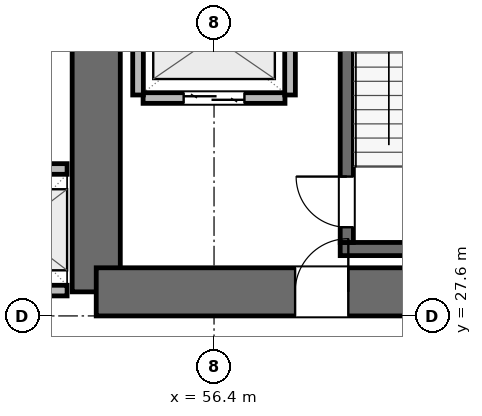
"""IFC4 building model, lengths in metres.
Left out: names, types, materials, properties, quantities, classifications, styles, units other than length and angle.
Written with IfcOpenShell. Run it as: python <this file> out.ifc"""

import sys

from ifc_helpers import new_model, si_unit, direction, frame, frame_2d, origin, place, context, subcontext, project, spatial, rectangle, extrude, element, fill, save


model = new_model("IFC4")
c1 = context("Model", 3, precision=1e-05, world=origin(), true_north=direction((0.0, 1.0)))
c2 = subcontext(c1, "Body", "Model", "MODEL_VIEW")
j1 = project(units=[si_unit("LENGTHUNIT", "METRE"), si_unit("PLANEANGLEUNIT", "RADIAN")], contexts=[c1])
p1 = place(None, origin())
s1 = spatial("IfcSite", under=j1, at=p1, CompositionType="ELEMENT")
p2 = place(p1, origin())
s2 = spatial("IfcBuilding", under=s1, at=p2, CompositionType="ELEMENT")
p3 = place(p2, frame((0.0, 0.0, 89.7)))
s3 = spatial("IfcBuildingStorey", under=s2, at=p3, CompositionType="ELEMENT", Elevation=89.7)
p4 = place(p3, frame((54.075, 28.075, 0.0), z_axis=(0.0, 0.0, 1.0), x_axis=(0.0, 1.0, 0.0)))
e1 = element("IfcWall", 1, at=p4, inside=s3, PredefinedType="SHEAR", context=c2, shape_type="SweptSolid", body=[
    extrude(rectangle(XDim=7.725, YDim=0.95, at=frame_2d((3.863, 0.0))), origin(), (0.0, 0.0, 1.0), 3.9),
])
p5 = place(p3, frame((54.075, 28.075, 0.0), z_axis=(0.0, 0.0, 1.0), x_axis=(1.0, 0.0, 0.0)))
e2 = element("IfcWall", 2, at=p5, inside=s3, PredefinedType="SHEAR", context=c2, shape_type="SweptSolid", body=[
    extrude(rectangle(XDim=9.05, YDim=0.95, at=frame_2d((4.525, 0.0))), origin(), (0.0, 0.0, 1.0), 3.9),
])
p6 = place(p5, frame((3.925, 0.0, 0.0)))
e3 = element("IfcOpeningElement", 3, at=p6, cuts=e2, PredefinedType="OPENING", context=c2, shape_type="SweptSolid", body=[
    extrude(rectangle(XDim=1.05, YDim=2.04, at=frame_2d((0.525, 1.02))), frame((0.0, 0.485, 0.0), z_axis=(0.0, -1.0, 0.0), x_axis=(1.0, 0.0, 0.0)), (0.0, 0.0, 1.0), 0.97),
])
p7 = place(p3, frame((58.89, 28.92, 0.0), z_axis=(0.0, 0.0, 1.0), x_axis=(1.0, 0.0, 0.0)))
e4 = element("IfcWall", 4, at=p7, inside=s3, PredefinedType="SHEAR", context=c2, shape_type="SweptSolid", body=[
    extrude(rectangle(XDim=3.76, YDim=0.26, at=frame_2d((1.88, 0.0))), origin(), (0.0, 0.0, 1.0), 3.9),
])
p8 = place(p3, frame((59.02, 29.05, 0.0), z_axis=(0.0, 0.0, 1.0), x_axis=(0.0, 1.0, 0.0)))
e5 = element("IfcWall", 5, at=p8, inside=s3, PredefinedType="SHEAR", context=c2, shape_type="SweptSolid", body=[
    extrude(rectangle(XDim=7.6, YDim=0.26, at=frame_2d((3.8, 0.0))), origin(), (0.0, 0.0, 1.0), 3.9),
])
p9 = place(p8, frame((0.3, 0.0, 0.0)))
e6 = element("IfcOpeningElement", 6, at=p9, cuts=e5, PredefinedType="OPENING", context=c2, shape_type="SweptSolid", body=[
    extrude(rectangle(XDim=1.0, YDim=2.04, at=frame_2d((0.5, 1.02))), frame((0.0, 0.14, 0.0), z_axis=(0.0, -1.0, 0.0), x_axis=(1.0, 0.0, 0.0)), (0.0, 0.0, 1.0), 0.28),
])
p10 = place(p3, frame((55.0, 31.9, 0.0), z_axis=(0.0, 0.0, 1.0), x_axis=(1.0, 0.0, 0.0)))
e7 = element("IfcWall", 7, at=p10, inside=s3, PredefinedType="PARTITIONING", context=c2, shape_type="SweptSolid", body=[
    extrude(rectangle(XDim=2.8, YDim=0.21, at=frame_2d((1.4, 0.0))), origin(), (0.0, 0.0, 1.0), 3.64),
])
p11 = place(p10, frame((0.8, 0.0, 0.0)))
e8 = element("IfcOpeningElement", 8, at=p11, cuts=e7, PredefinedType="OPENING", context=c2, shape_type="SweptSolid", body=[
    extrude(rectangle(XDim=1.2, YDim=2.04, at=frame_2d((0.6, 1.02))), frame((0.0, 0.115, 0.0), z_axis=(0.0, -1.0, 0.0), x_axis=(1.0, 0.0, 0.0)), (0.0, 0.0, 1.0), 0.23),
])
for number, where, z_axis, x_axis in (
    (9, (54.9, 31.96, 0.0), (0.0, 0.0, 1.0), (0.0, 1.0, 0.0)),
    (10, (57.9, 31.96, 0.0), (0.0, 0.0, 1.0), (0.0, 1.0, 0.0)),
):
    element("IfcWall", number, at=place(p3, frame(where, z_axis=z_axis, x_axis=x_axis)), inside=s3, PredefinedType="PARTITIONING", context=c2, shape_type="SweptSolid", body=[
        extrude(rectangle(XDim=2.28, YDim=0.21, at=frame_2d((1.14, 0.0))), origin(), (0.0, 0.0, 1.0), 3.64),
    ])
p12 = place(p3, frame((51.4, 30.5, 0.0), z_axis=(0.0, 0.0, 1.0), x_axis=(1.0, 0.0, 0.0)))
e11 = element("IfcWall", 11, at=p12, inside=s3, PredefinedType="PARTITIONING", context=c2, shape_type="SweptSolid", body=[
    extrude(rectangle(XDim=2.1, YDim=0.21, at=frame_2d((1.05, 0.0))), origin(), (0.0, 0.0, 1.0), 3.64),
])
p13 = place(p12, frame((0.5, 0.0, 0.0)))
e12 = element("IfcOpeningElement", 12, at=p13, cuts=e11, PredefinedType="OPENING", context=c2, shape_type="SweptSolid", body=[
    extrude(rectangle(XDim=1.1, YDim=2.04, at=frame_2d((0.55, 1.02))), frame((0.0, 0.115, 0.0), z_axis=(0.0, -1.0, 0.0), x_axis=(1.0, 0.0, 0.0)), (0.0, 0.0, 1.0), 0.23),
])
p14 = place(p3, frame((51.4, 28.1, 0.0), z_axis=(0.0, 0.0, 1.0), x_axis=(1.0, 0.0, 0.0)))
e13 = element("IfcWall", 13, at=p14, inside=s3, PredefinedType="PARTITIONING", context=c2, shape_type="SweptSolid", body=[
    extrude(rectangle(XDim=2.1, YDim=0.21, at=frame_2d((1.05, 0.0))), origin(), (0.0, 0.0, 1.0), 2.525),
])
p15 = place(p9, origin())
e14 = element("IfcDoor", 14, at=p15, inside=s3, OperationType="SINGLE_SWING_RIGHT", PredefinedType="DOOR", context=c2, shape_type="SweptSolid", body=[
    extrude(rectangle(XDim=1.0, YDim=2.04, at=frame_2d((0.5, 1.02))), frame((0.0, 0.025, 0.0), z_axis=(0.0, -1.0, 0.0), x_axis=(1.0, 0.0, 0.0)), (0.0, 0.0, 1.0), 0.05),
])
fill(e6, e14)
p16 = place(p11, origin())
e15 = element("IfcDoor", 15, at=p16, inside=s3, OperationType="DOUBLE_DOOR_SLIDING", PredefinedType="DOOR", context=c2, shape_type="SweptSolid", body=[
    extrude(rectangle(XDim=1.2, YDim=2.04, at=frame_2d((0.6, 1.02))), frame((0.0, 0.025, 0.0), z_axis=(0.0, -1.0, 0.0), x_axis=(1.0, 0.0, 0.0)), (0.0, 0.0, 1.0), 0.05),
])
fill(e8, e15)
p17 = place(p6, origin())
e16 = element("IfcDoor", 16, at=p17, inside=s3, OperationType="SINGLE_SWING_RIGHT", PredefinedType="DOOR", context=c2, shape_type="SweptSolid", body=[
    extrude(rectangle(XDim=1.05, YDim=2.04, at=frame_2d((0.525, 1.02))), frame((0.0, 0.025, 0.0), z_axis=(0.0, -1.0, 0.0), x_axis=(1.0, 0.0, 0.0)), (0.0, 0.0, 1.0), 0.05),
])
fill(e3, e16)
save(model, sys.argv[1])
